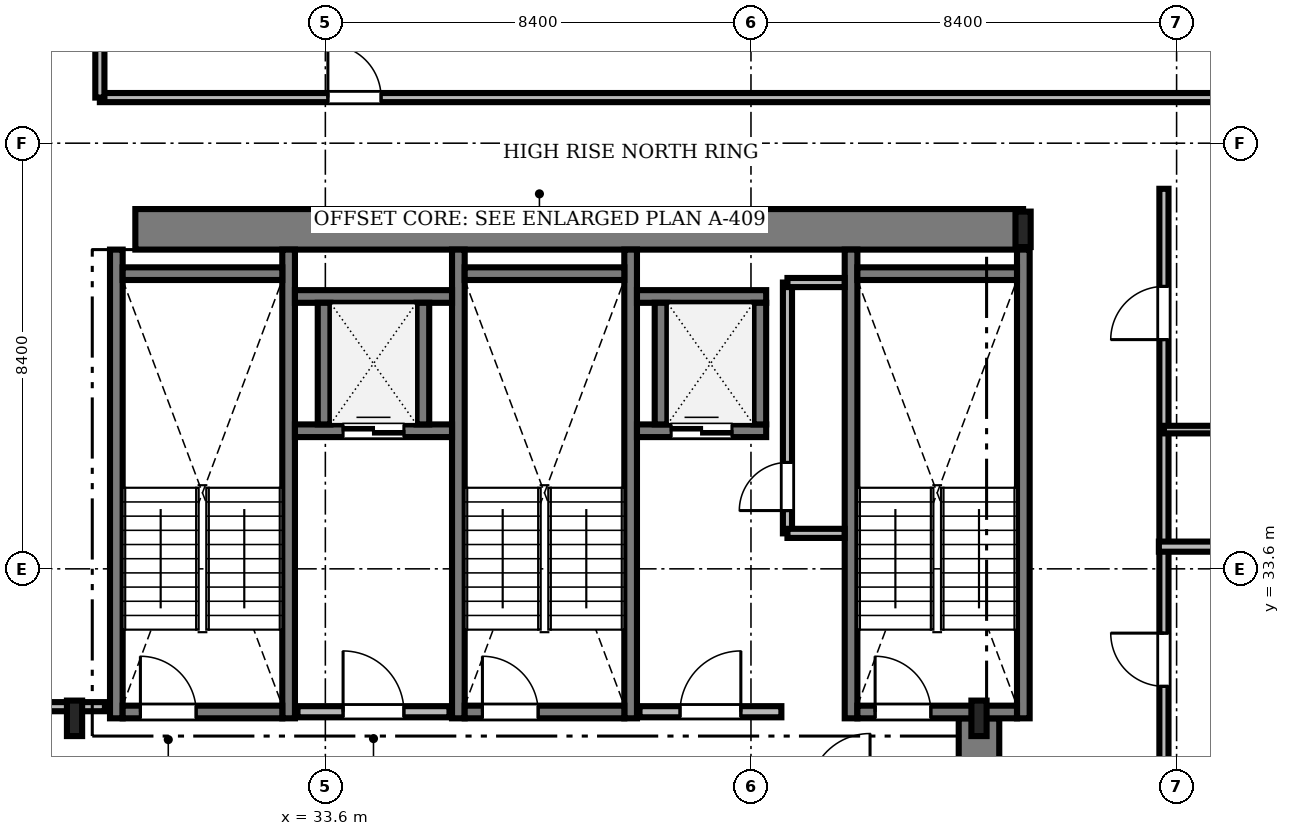
"""IFC4 building model, lengths in metres.
Left out: names, types, materials, properties, quantities, classifications, styles, units other than length and angle.
Written with IfcOpenShell. Run it as: python <this file> out.ifc"""

import sys

from ifc_helpers import new_model, si_unit, direction, frame, frame_2d, origin, origin_2d, place, context, subcontext, project, spatial, rectangle, i_section, extrude, source, transform, mapped, element, fill, save


model = new_model("IFC4")
c1 = context("Model", 3, precision=1e-05, world=origin(), true_north=direction((0.0, 1.0)))
c2 = subcontext(c1, "Body", "Model", "MODEL_VIEW")
j1 = project(units=[si_unit("LENGTHUNIT", "METRE"), si_unit("PLANEANGLEUNIT", "RADIAN")], contexts=[c1])
p1 = place(None, origin())
s1 = spatial("IfcSite", under=j1, at=p1, CompositionType="ELEMENT")
p2 = place(p1, origin())
s2 = spatial("IfcBuilding", under=s1, at=p2, CompositionType="ELEMENT")
p3 = place(p2, frame((0.0, 0.0, 181.0)))
s3 = spatial("IfcBuildingStorey", under=s2, at=p3, CompositionType="ELEMENT", Elevation=181.0)
m1 = source(origin(), c2, "Body", "SweptSolid", [
    extrude(rectangle(XDim=17.52, YDim=0.8, at=frame_2d((8.76, 0.0))), origin(), (0.0, 0.0, 1.0), 3.58),
])
p4 = place(p3, frame((29.85, 40.3, 0.0), z_axis=(0.0, 0.0, 1.0), x_axis=(1.0, 0.0, 0.0)))
e1 = element("IfcWall", 1, at=p4, inside=s3, PredefinedType="SHEAR", context=c2, shape_type="MappedRepresentation", body=[
    mapped(m1, transform((0.0, 0.0, 0.0), scale=1.0)),
])
m2 = source(origin(), c2, "Body", "SweptSolid", [
    extrude(rectangle(XDim=13.15, YDim=0.8, at=frame_2d((6.575, 0.0))), origin(), (0.0, 0.0, 1.0), 3.58),
])
p5 = place(p3, frame((46.5, 17.5, 0.0), z_axis=(0.0, 0.0, 1.0), x_axis=(0.0, 1.0, 0.0)))
e2 = element("IfcWall", 2, at=p5, inside=s3, PredefinedType="SHEAR", context=c2, shape_type="MappedRepresentation", body=[
    mapped(m2, transform((0.0, 0.0, 0.0), scale=1.0)),
])
m3 = source(origin(), c2, "Body", "SweptSolid", [
    extrude(i_section(OverallWidth=0.3, OverallDepth=0.7, WebThickness=0.017, FlangeThickness=0.032, FilletRadius=0.027, at=origin_2d()), origin(), (0.0, 0.0, 1.0), 3.58),
])
for number, where, z_axis, x_axis in (
    (3, (28.65, 30.65, 0.0), (0.0, 0.0, 1.0), (1.0, 0.0, 0.0)),
    (4, (46.5, 30.65, 0.0), (0.0, 0.0, 1.0), (1.0, 0.0, 0.0)),
    (5, (47.37, 40.3, 0.0), (0.0, 0.0, 1.0), (1.0, 0.0, 0.0)),
):
    element("IfcColumn", number, at=place(p3, frame(where, z_axis=z_axis, x_axis=x_axis)), inside=s3, PredefinedType="COLUMN", context=c2, shape_type="MappedRepresentation", body=[
        mapped(m3, transform((0.0, 0.0, 0.0), scale=1.0)),
    ])
m4 = source(origin(), c2, "Body", "SweptSolid", [
    extrude(rectangle(XDim=9.25, YDim=0.25, at=frame_2d((4.625, 0.0))), origin(), (0.0, 0.0, 1.0), 3.6),
])
for number, where, z_axis, x_axis in (
    (6, (29.475, 30.65, 0.0), (0.0, 0.0, 1.0), (0.0, 1.0, 0.0)),
    (7, (32.875, 30.65, 0.0), (0.0, 0.0, 1.0), (0.0, 1.0, 0.0)),
):
    element("IfcWall", number, at=place(p3, frame(where, z_axis=z_axis, x_axis=x_axis)), inside=s3, PredefinedType="SOLIDWALL", context=c2, shape_type="MappedRepresentation", body=[
        mapped(m4, transform((0.0, 0.0, 0.0), scale=1.0)),
    ])
m5 = source(origin(), c2, "Body", "SweptSolid", [
    extrude(rectangle(XDim=3.15, YDim=0.25, at=frame_2d((1.575, 0.0))), origin(), (0.0, 0.0, 1.0), 3.6),
])
p6 = place(p3, frame((29.6, 39.425, 0.0), z_axis=(0.0, 0.0, 1.0), x_axis=(1.0, 0.0, 0.0)))
e8 = element("IfcWall", 8, at=p6, inside=s3, PredefinedType="SOLIDWALL", context=c2, shape_type="MappedRepresentation", body=[
    mapped(m5, transform((0.0, 0.0, 0.0), scale=1.0)),
])
p7 = place(p3, frame((29.6, 30.775, 0.0), z_axis=(0.0, 0.0, 1.0), x_axis=(1.0, 0.0, 0.0)))
e9 = element("IfcWall", 9, at=p7, inside=s3, PredefinedType="SOLIDWALL", context=c2, shape_type="MappedRepresentation", body=[
    mapped(m5, transform((0.0, 0.0, 0.0), scale=1.0)),
])
m6 = source(origin(), c2, "Body", "SweptSolid", [
    extrude(rectangle(XDim=1.1, YDim=2.2, at=frame_2d((0.55, 1.1))), frame((0.0, 0.135, 0.0), z_axis=(0.0, -1.0, 0.0), x_axis=(1.0, 0.0, 0.0)), (0.0, 0.0, 1.0), 0.27),
])
p8 = place(p7, frame((0.35, 0.0, 0.0)))
e10 = element("IfcOpeningElement", 10, at=p8, cuts=e9, PredefinedType="OPENING", context=c2, shape_type="MappedRepresentation", body=[
    mapped(m6, transform((0.0, 0.0, 0.0), scale=1.0)),
])
for number, where, z_axis, x_axis in (
    (11, (36.225, 30.65, 0.0), (0.0, 0.0, 1.0), (0.0, 1.0, 0.0)),
    (12, (39.625, 30.65, 0.0), (0.0, 0.0, 1.0), (0.0, 1.0, 0.0)),
):
    element("IfcWall", number, at=place(p3, frame(where, z_axis=z_axis, x_axis=x_axis)), inside=s3, PredefinedType="SOLIDWALL", context=c2, shape_type="MappedRepresentation", body=[
        mapped(m4, transform((0.0, 0.0, 0.0), scale=1.0)),
    ])
p9 = place(p3, frame((36.35, 39.425, 0.0), z_axis=(0.0, 0.0, 1.0), x_axis=(1.0, 0.0, 0.0)))
e13 = element("IfcWall", 13, at=p9, inside=s3, PredefinedType="SOLIDWALL", context=c2, shape_type="MappedRepresentation", body=[
    mapped(m5, transform((0.0, 0.0, 0.0), scale=1.0)),
])
p10 = place(p3, frame((36.35, 30.775, 0.0), z_axis=(0.0, 0.0, 1.0), x_axis=(1.0, 0.0, 0.0)))
e14 = element("IfcWall", 14, at=p10, inside=s3, PredefinedType="SOLIDWALL", context=c2, shape_type="MappedRepresentation", body=[
    mapped(m5, transform((0.0, 0.0, 0.0), scale=1.0)),
])
p11 = place(p10, frame((0.35, 0.0, 0.0)))
e15 = element("IfcOpeningElement", 15, at=p11, cuts=e14, PredefinedType="OPENING", context=c2, shape_type="MappedRepresentation", body=[
    mapped(m6, transform((0.0, 0.0, 0.0), scale=1.0)),
])
for number, where, z_axis, x_axis in (
    (16, (43.975, 30.65, 0.0), (0.0, 0.0, 1.0), (0.0, 1.0, 0.0)),
    (17, (47.375, 30.65, 0.0), (0.0, 0.0, 1.0), (0.0, 1.0, 0.0)),
):
    element("IfcWall", number, at=place(p3, frame(where, z_axis=z_axis, x_axis=x_axis)), inside=s3, PredefinedType="SOLIDWALL", context=c2, shape_type="MappedRepresentation", body=[
        mapped(m4, transform((0.0, 0.0, 0.0), scale=1.0)),
    ])
p12 = place(p3, frame((44.1, 39.425, 0.0), z_axis=(0.0, 0.0, 1.0), x_axis=(1.0, 0.0, 0.0)))
e18 = element("IfcWall", 18, at=p12, inside=s3, PredefinedType="SOLIDWALL", context=c2, shape_type="MappedRepresentation", body=[
    mapped(m5, transform((0.0, 0.0, 0.0), scale=1.0)),
])
p13 = place(p3, frame((44.1, 30.775, 0.0), z_axis=(0.0, 0.0, 1.0), x_axis=(1.0, 0.0, 0.0)))
e19 = element("IfcWall", 19, at=p13, inside=s3, PredefinedType="SOLIDWALL", context=c2, shape_type="MappedRepresentation", body=[
    mapped(m5, transform((0.0, 0.0, 0.0), scale=1.0)),
])
p14 = place(p13, frame((0.35, 0.0, 0.0)))
e20 = element("IfcOpeningElement", 20, at=p14, cuts=e19, PredefinedType="OPENING", context=c2, shape_type="MappedRepresentation", body=[
    mapped(m6, transform((0.0, 0.0, 0.0), scale=1.0)),
])
m7 = source(origin(), c2, "Body", "SweptSolid", [
    extrude(rectangle(XDim=3.0, YDim=0.22, at=frame_2d((1.5, 0.0))), origin(), (0.0, 0.0, 1.0), 3.58),
])
p15 = place(p3, frame((33.05, 30.78, 0.0), z_axis=(0.0, 0.0, 1.0), x_axis=(1.0, 0.0, 0.0)))
e21 = element("IfcWall", 21, at=p15, inside=s3, PredefinedType="SOLIDWALL", context=c2, shape_type="MappedRepresentation", body=[
    mapped(m7, transform((0.0, 0.0, 0.0), scale=1.0)),
])
m8 = source(origin(), c2, "Body", "SweptSolid", [
    extrude(rectangle(XDim=1.2, YDim=2.2, at=frame_2d((0.6, 1.1))), frame((0.0, 0.12, 0.0), z_axis=(0.0, -1.0, 0.0), x_axis=(1.0, 0.0, 0.0)), (0.0, 0.0, 1.0), 0.24),
])
p16 = place(p15, frame((0.9, 0.0, 0.0)))
e22 = element("IfcOpeningElement", 22, at=p16, cuts=e21, PredefinedType="OPENING", context=c2, shape_type="MappedRepresentation", body=[
    mapped(m8, transform((0.0, 0.0, 0.0), scale=1.0)),
])
m9 = source(origin(), c2, "Body", "SweptSolid", [
    extrude(rectangle(XDim=2.8, YDim=0.22, at=frame_2d((1.4, 0.0))), origin(), (0.0, 0.0, 1.0), 3.58),
])
p17 = place(p3, frame((39.8, 30.78, 0.0), z_axis=(0.0, 0.0, 1.0), x_axis=(1.0, 0.0, 0.0)))
e23 = element("IfcWall", 23, at=p17, inside=s3, PredefinedType="SOLIDWALL", context=c2, shape_type="MappedRepresentation", body=[
    mapped(m9, transform((0.0, 0.0, 0.0), scale=1.0)),
])
p18 = place(p17, frame((0.8, 0.0, 0.0)))
e24 = element("IfcOpeningElement", 24, at=p18, cuts=e23, PredefinedType="OPENING", context=c2, shape_type="MappedRepresentation", body=[
    mapped(m8, transform((0.0, 0.0, 0.0), scale=1.0)),
])
m10 = source(origin(), c2, "Body", "SweptSolid", [
    extrude(rectangle(XDim=3.1, YDim=0.25, at=frame_2d((1.55, 0.0))), origin(), (0.0, 0.0, 1.0), 3.58),
])
p19 = place(p3, frame((33.0, 36.325, 0.0), z_axis=(0.0, 0.0, 1.0), x_axis=(1.0, 0.0, 0.0)))
e25 = element("IfcWall", 25, at=p19, inside=s3, PredefinedType="SOLIDWALL", context=c2, shape_type="MappedRepresentation", body=[
    mapped(m10, transform((0.0, 0.0, 0.0), scale=1.0)),
])
m11 = source(origin(), c2, "Body", "SweptSolid", [
    extrude(rectangle(XDim=1.2, YDim=2.25, at=frame_2d((0.6, 1.125))), frame((0.0, 0.135, 0.0), z_axis=(0.0, -1.0, 0.0), x_axis=(1.0, 0.0, 0.0)), (0.0, 0.0, 1.0), 0.27),
])
p20 = place(p19, frame((0.95, 0.0, 0.0)))
e26 = element("IfcOpeningElement", 26, at=p20, cuts=e25, PredefinedType="OPENING", context=c2, shape_type="MappedRepresentation", body=[
    mapped(m11, transform((0.0, 0.0, 0.0), scale=1.0)),
])
p21 = place(p3, frame((33.0, 38.975, 0.0), z_axis=(0.0, 0.0, 1.0), x_axis=(1.0, 0.0, 0.0)))
e27 = element("IfcWall", 27, at=p21, inside=s3, PredefinedType="SOLIDWALL", context=c2, shape_type="MappedRepresentation", body=[
    mapped(m10, transform((0.0, 0.0, 0.0), scale=1.0)),
])
m12 = source(origin(), c2, "Body", "SweptSolid", [
    extrude(rectangle(XDim=2.4, YDim=0.25, at=frame_2d((1.2, 0.0))), origin(), (0.0, 0.0, 1.0), 3.58),
])
for number, where, z_axis, x_axis in (
    (28, (33.575, 36.45, 0.0), (0.0, 0.0, 1.0), (0.0, 1.0, 0.0)),
    (29, (35.525, 36.45, 0.0), (0.0, 0.0, 1.0), (0.0, 1.0, 0.0)),
):
    element("IfcWall", number, at=place(p3, frame(where, z_axis=z_axis, x_axis=x_axis)), inside=s3, PredefinedType="SOLIDWALL", context=c2, shape_type="MappedRepresentation", body=[
        mapped(m12, transform((0.0, 0.0, 0.0), scale=1.0)),
    ])
m13 = source(origin(), c2, "Body", "SweptSolid", [
    extrude(rectangle(XDim=2.55, YDim=0.25, at=frame_2d((1.275, 0.0))), origin(), (0.0, 0.0, 1.0), 3.58),
])
p22 = place(p3, frame((39.75, 36.325, 0.0), z_axis=(0.0, 0.0, 1.0), x_axis=(1.0, 0.0, 0.0)))
e30 = element("IfcWall", 30, at=p22, inside=s3, PredefinedType="SOLIDWALL", context=c2, shape_type="MappedRepresentation", body=[
    mapped(m13, transform((0.0, 0.0, 0.0), scale=1.0)),
])
p23 = place(p22, frame((0.675, 0.0, 0.0)))
e31 = element("IfcOpeningElement", 31, at=p23, cuts=e30, PredefinedType="OPENING", context=c2, shape_type="MappedRepresentation", body=[
    mapped(m11, transform((0.0, 0.0, 0.0), scale=1.0)),
])
p24 = place(p3, frame((39.75, 38.975, 0.0), z_axis=(0.0, 0.0, 1.0), x_axis=(1.0, 0.0, 0.0)))
e32 = element("IfcWall", 32, at=p24, inside=s3, PredefinedType="SOLIDWALL", context=c2, shape_type="MappedRepresentation", body=[
    mapped(m13, transform((0.0, 0.0, 0.0), scale=1.0)),
])
for number, where, z_axis, x_axis in (
    (33, (40.225, 36.45, 0.0), (0.0, 0.0, 1.0), (0.0, 1.0, 0.0)),
    (34, (42.175, 36.45, 0.0), (0.0, 0.0, 1.0), (0.0, 1.0, 0.0)),
):
    element("IfcWall", number, at=place(p3, frame(where, z_axis=z_axis, x_axis=x_axis)), inside=s3, PredefinedType="SOLIDWALL", context=c2, shape_type="MappedRepresentation", body=[
        mapped(m12, transform((0.0, 0.0, 0.0), scale=1.0)),
    ])
m14 = source(origin(), c2, "Body", "SweptSolid", [
    extrude(rectangle(XDim=28.428, YDim=0.18, at=frame_2d((14.214, 0.0))), origin(), (0.0, 0.0, 1.0), 2.822),
])
p25 = place(p3, frame((29.15, 42.9, 0.0), z_axis=(0.0, 0.0, 1.0), x_axis=(1.0, 0.0, 0.0)))
e35 = element("IfcWall", 35, at=p25, inside=s3, PredefinedType="PARTITIONING", context=c2, shape_type="MappedRepresentation", body=[
    mapped(m14, transform((0.0, 0.0, 0.0), scale=1.0)),
])
m15 = source(origin(), c2, "Body", "SweptSolid", [
    extrude(rectangle(XDim=1.05, YDim=2.2, at=frame_2d((0.525, 1.1))), frame((0.0, 0.1, 0.0), z_axis=(0.0, -1.0, 0.0), x_axis=(1.0, 0.0, 0.0)), (0.0, 0.0, 1.0), 0.2),
])
p26 = place(p25, frame((4.5, 0.0, 0.0)))
e36 = element("IfcOpeningElement", 36, at=p26, cuts=e35, PredefinedType="OPENING", context=c2, shape_type="MappedRepresentation", body=[
    mapped(m15, transform((0.0, 0.0, 0.0), scale=1.0)),
])
m16 = source(origin(), c2, "Body", "SweptSolid", [
    extrude(rectangle(XDim=27.59, YDim=0.18, at=frame_2d((13.795, 0.0))), origin(), (0.0, 0.0, 1.0), 3.022),
])
p27 = place(p3, frame((50.15, 13.51, 0.0), z_axis=(0.0, 0.0, 1.0), x_axis=(0.0, 1.0, 0.0)))
e37 = element("IfcWall", 37, at=p27, inside=s3, PredefinedType="PARTITIONING", context=c2, shape_type="MappedRepresentation", body=[
    mapped(m16, transform((0.0, 0.0, 0.0), scale=1.0)),
])
p28 = place(p27, frame((4.086, 0.0, 0.0)))
e38 = element("IfcOpeningElement", 38, at=p28, cuts=e37, PredefinedType="OPENING", context=c2, shape_type="MappedRepresentation", body=[
    mapped(m15, transform((0.0, 0.0, 0.0), scale=1.0)),
])
p29 = place(p27, frame((9.744, 0.0, 0.0)))
e39 = element("IfcOpeningElement", 39, at=p29, cuts=e37, PredefinedType="OPENING", context=c2, shape_type="MappedRepresentation", body=[
    mapped(m15, transform((0.0, 0.0, 0.0), scale=1.0)),
])
p30 = place(p27, frame((17.771, 0.0, 0.0)))
e40 = element("IfcOpeningElement", 40, at=p30, cuts=e37, PredefinedType="OPENING", context=c2, shape_type="MappedRepresentation", body=[
    mapped(m15, transform((0.0, 0.0, 0.0), scale=1.0)),
])
p31 = place(p27, frame((24.614, 0.0, 0.0)))
e41 = element("IfcOpeningElement", 41, at=p31, cuts=e37, PredefinedType="OPENING", context=c2, shape_type="MappedRepresentation", body=[
    mapped(m15, transform((0.0, 0.0, 0.0), scale=1.0)),
])
m17 = source(origin(), c2, "Body", "SweptSolid", [
    extrude(rectangle(XDim=17.828, YDim=0.18, at=frame_2d((8.914, 0.0))), origin(), (0.0, 0.0, 1.0), 2.822),
])
p32 = place(p3, frame((11.422, 30.88, 0.0), z_axis=(0.0, 0.0, 1.0), x_axis=(1.0, 0.0, 0.0)))
e42 = element("IfcWall", 42, at=p32, inside=s3, PredefinedType="PARTITIONING", context=c2, shape_type="MappedRepresentation", body=[
    mapped(m17, transform((0.0, 0.0, 0.0), scale=1.0)),
])
p33 = place(p32, frame((10.778, 0.0, 0.0)))
e43 = element("IfcOpeningElement", 43, at=p33, cuts=e42, PredefinedType="OPENING", context=c2, shape_type="MappedRepresentation", body=[
    mapped(m15, transform((0.0, 0.0, 0.0), scale=1.0)),
])
m18 = source(origin(), c2, "Body", "SweptSolid", [
    extrude(rectangle(XDim=4.95, YDim=0.18, at=frame_2d((2.475, 0.0))), origin(), (0.0, 0.0, 1.0), 3.58),
])
p34 = place(p3, frame((42.72, 34.3, 0.0), z_axis=(0.0, 0.0, 1.0), x_axis=(0.0, 1.0, 0.0)))
e44 = element("IfcWall", 44, at=p34, inside=s3, PredefinedType="PARTITIONING", context=c2, shape_type="MappedRepresentation", body=[
    mapped(m18, transform((0.0, 0.0, 0.0), scale=1.0)),
])
m19 = source(origin(), c2, "Body", "SweptSolid", [
    extrude(rectangle(XDim=0.95, YDim=2.15, at=frame_2d((0.475, 1.075))), frame((0.0, 0.1, 0.0), z_axis=(0.0, -1.0, 0.0), x_axis=(1.0, 0.0, 0.0)), (0.0, 0.0, 1.0), 0.2),
])
p35 = place(p34, frame((0.45, 0.0, 0.0)))
e45 = element("IfcOpeningElement", 45, at=p35, cuts=e44, PredefinedType="OPENING", context=c2, shape_type="MappedRepresentation", body=[
    mapped(m19, transform((0.0, 0.0, 0.0), scale=1.0)),
])
m20 = source(origin(), c2, "Body", "SweptSolid", [
    extrude(rectangle(XDim=7.528, YDim=0.2, at=frame_2d((3.764, 0.0))), origin(), (0.0, 0.0, 1.0), 2.822),
])
p36 = place(p3, frame((50.05, 34.038, 0.0), z_axis=(0.0, 0.0, 1.0), x_axis=(1.0, 0.0, 0.0)))
e46 = element("IfcWall", 46, at=p36, inside=s3, PredefinedType="PARTITIONING", context=c2, shape_type="MappedRepresentation", body=[
    mapped(m20, transform((0.0, 0.0, 0.0), scale=1.0)),
])
m21 = source(origin(), c2, "Body", "SweptSolid", [
    extrude(rectangle(XDim=5.378, YDim=0.18, at=frame_2d((2.689, 0.0))), origin(), (0.0, 0.0, 1.0), 2.822),
])
p37 = place(p3, frame((29.15, 42.9, 0.0), z_axis=(0.0, 0.0, 1.0), x_axis=(0.0, 1.0, 0.0)))
e47 = element("IfcWall", 47, at=p37, inside=s3, PredefinedType="PARTITIONING", context=c2, shape_type="MappedRepresentation", body=[
    mapped(m21, transform((0.0, 0.0, 0.0), scale=1.0)),
])
m22 = source(origin(), c2, "Body", "SweptSolid", [
    extrude(rectangle(XDim=2.36, YDim=0.15, at=frame_2d((1.18, 0.0))), origin(), (0.0, 0.0, 1.0), 3.58),
])
p38 = place(p3, frame((50.15, 36.348, 0.0), z_axis=(0.0, 0.0, 1.0), x_axis=(1.0, 0.0, 0.0)))
e48 = element("IfcWall", 48, at=p38, inside=s3, PredefinedType="PARTITIONING", context=c2, shape_type="MappedRepresentation", body=[
    mapped(m22, transform((0.0, 0.0, 0.0), scale=1.0)),
])
m23 = source(origin(), c2, "Body", "SweptSolid", [
    extrude(rectangle(XDim=1.128, YDim=0.18, at=frame_2d((0.564, 0.0))), origin(), (0.0, 0.0, 1.0), 3.58),
])
for number, where, z_axis, x_axis in (
    (49, (42.72, 34.3, 0.0), (0.0, 0.0, 1.0), (1.0, 0.0, 0.0)),
    (50, (42.72, 39.25, 0.0), (0.0, 0.0, 1.0), (1.0, 0.0, 0.0)),
):
    element("IfcWall", number, at=place(p3, frame(where, z_axis=z_axis, x_axis=x_axis)), inside=s3, PredefinedType="PARTITIONING", context=c2, shape_type="MappedRepresentation", body=[
        mapped(m23, transform((0.0, 0.0, 0.0), scale=1.0)),
    ])
m24 = source(origin(), c2, "Body", "SweptSolid", [
    extrude(rectangle(XDim=1.1, YDim=2.2, at=frame_2d((0.55, 1.1))), frame((0.0, 0.025, 0.0), z_axis=(0.0, -1.0, 0.0), x_axis=(1.0, 0.0, 0.0)), (0.0, 0.0, 1.0), 0.05),
])
p39 = place(p8, origin())
e51 = element("IfcDoor", 51, at=p39, inside=s3, OperationType="SINGLE_SWING_LEFT", PredefinedType="DOOR", context=c2, shape_type="MappedRepresentation", body=[
    mapped(m24, transform((0.0, 0.0, 0.0), scale=1.0)),
])
fill(e10, e51)
p40 = place(p11, origin())
e52 = element("IfcDoor", 52, at=p40, inside=s3, OperationType="SINGLE_SWING_LEFT", PredefinedType="DOOR", context=c2, shape_type="MappedRepresentation", body=[
    mapped(m24, transform((0.0, 0.0, 0.0), scale=1.0)),
])
fill(e15, e52)
p41 = place(p14, origin())
e53 = element("IfcDoor", 53, at=p41, inside=s3, OperationType="SINGLE_SWING_LEFT", PredefinedType="DOOR", context=c2, shape_type="MappedRepresentation", body=[
    mapped(m24, transform((0.0, 0.0, 0.0), scale=1.0)),
])
fill(e20, e53)
m25 = source(origin(), c2, "Body", "SweptSolid", [
    extrude(rectangle(XDim=1.2, YDim=2.2, at=frame_2d((0.6, 1.1))), frame((0.0, 0.025, 0.0), z_axis=(0.0, -1.0, 0.0), x_axis=(1.0, 0.0, 0.0)), (0.0, 0.0, 1.0), 0.05),
])
p42 = place(p16, origin())
e54 = element("IfcDoor", 54, at=p42, inside=s3, OperationType="SINGLE_SWING_LEFT", PredefinedType="DOOR", context=c2, shape_type="MappedRepresentation", body=[
    mapped(m25, transform((0.0, 0.0, 0.0), scale=1.0)),
])
fill(e22, e54)
p43 = place(p18, origin())
e55 = element("IfcDoor", 55, at=p43, inside=s3, OperationType="SINGLE_SWING_RIGHT", PredefinedType="DOOR", context=c2, shape_type="MappedRepresentation", body=[
    mapped(m25, transform((0.0, 0.0, 0.0), scale=1.0)),
])
fill(e24, e55)
m26 = source(origin(), c2, "Body", "SweptSolid", [
    extrude(rectangle(XDim=1.2, YDim=2.25, at=frame_2d((0.6, 1.125))), frame((0.0, 0.025, 0.0), z_axis=(0.0, -1.0, 0.0), x_axis=(1.0, 0.0, 0.0)), (0.0, 0.0, 1.0), 0.05),
])
p44 = place(p20, origin())
e56 = element("IfcDoor", 56, at=p44, inside=s3, OperationType="DOUBLE_DOOR_SLIDING", PredefinedType="DOOR", context=c2, shape_type="MappedRepresentation", body=[
    mapped(m26, transform((0.0, 0.0, 0.0), scale=1.0)),
])
fill(e26, e56)
p45 = place(p23, origin())
e57 = element("IfcDoor", 57, at=p45, inside=s3, OperationType="DOUBLE_DOOR_SLIDING", PredefinedType="DOOR", context=c2, shape_type="MappedRepresentation", body=[
    mapped(m26, transform((0.0, 0.0, 0.0), scale=1.0)),
])
fill(e31, e57)
m27 = source(origin(), c2, "Body", "SweptSolid", [
    extrude(rectangle(XDim=1.05, YDim=2.2, at=frame_2d((0.525, 1.1))), frame((0.0, 0.025, 0.0), z_axis=(0.0, -1.0, 0.0), x_axis=(1.0, 0.0, 0.0)), (0.0, 0.0, 1.0), 0.05),
])
p46 = place(p26, origin())
e58 = element("IfcDoor", 58, at=p46, inside=s3, OperationType="SINGLE_SWING_LEFT", PredefinedType="DOOR", context=c2, shape_type="MappedRepresentation", body=[
    mapped(m27, transform((0.0, 0.0, 0.0), scale=1.0)),
])
fill(e36, e58)
p47 = place(p30, origin())
e59 = element("IfcDoor", 59, at=p47, inside=s3, OperationType="SINGLE_SWING_RIGHT", PredefinedType="DOOR", context=c2, shape_type="MappedRepresentation", body=[
    mapped(m27, transform((0.0, 0.0, 0.0), scale=1.0)),
])
fill(e40, e59)
p48 = place(p31, origin())
e60 = element("IfcDoor", 60, at=p48, inside=s3, OperationType="SINGLE_SWING_LEFT", PredefinedType="DOOR", context=c2, shape_type="MappedRepresentation", body=[
    mapped(m27, transform((0.0, 0.0, 0.0), scale=1.0)),
])
fill(e41, e60)
m28 = source(origin(), c2, "Body", "SweptSolid", [
    extrude(rectangle(XDim=0.95, YDim=2.15, at=frame_2d((0.475, 1.075))), frame((0.0, 0.025, 0.0), z_axis=(0.0, -1.0, 0.0), x_axis=(1.0, 0.0, 0.0)), (0.0, 0.0, 1.0), 0.05),
])
p49 = place(p35, origin())
e61 = element("IfcDoor", 61, at=p49, inside=s3, OperationType="SINGLE_SWING_LEFT", PredefinedType="DOOR", context=c2, shape_type="MappedRepresentation", body=[
    mapped(m28, transform((0.0, 0.0, 0.0), scale=1.0)),
])
fill(e45, e61)
save(model, sys.argv[1])
